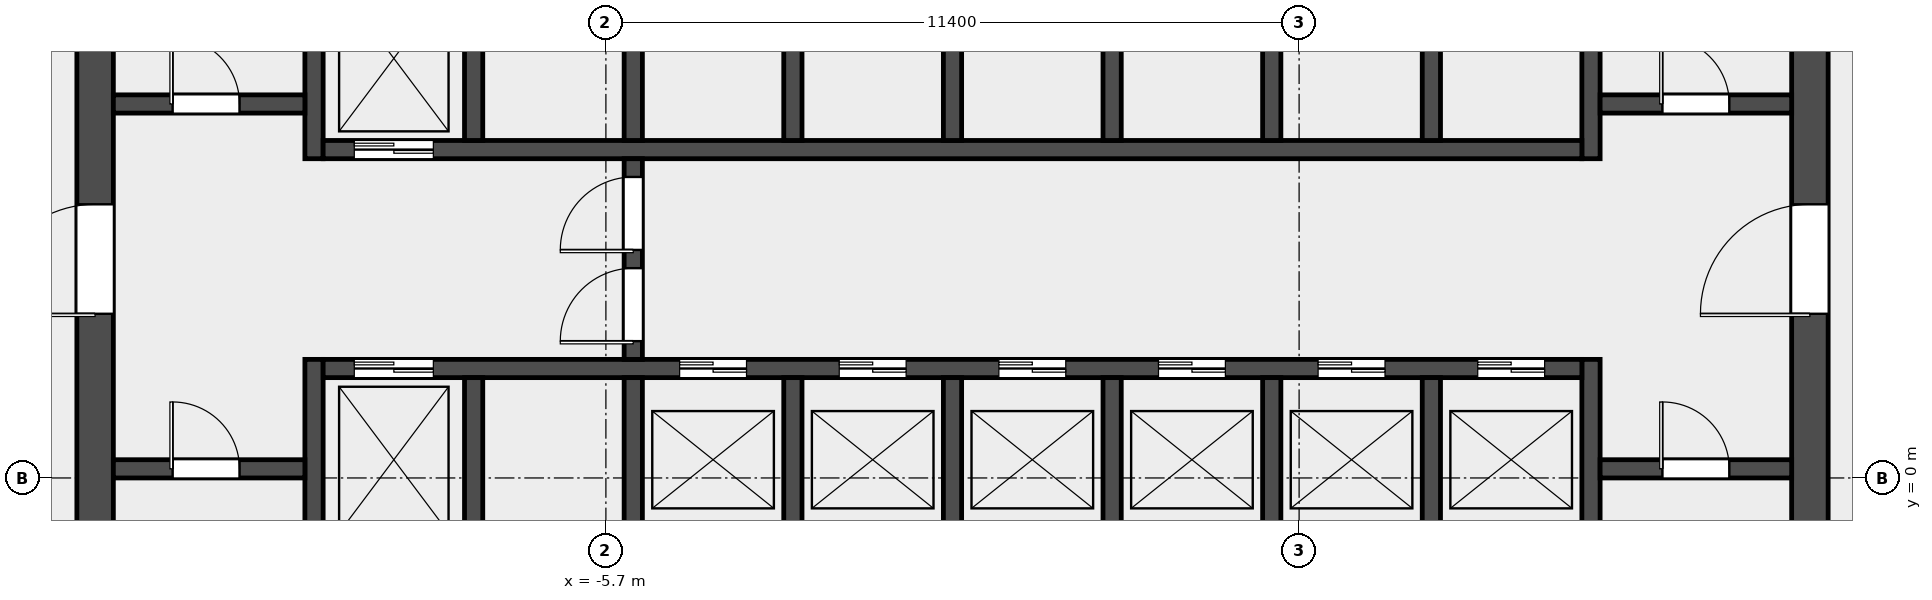
"""IFC4 building model, lengths in metres.
Left out: names, types, materials, properties, quantities, classifications, styles, units other than length and angle.
Written with IfcOpenShell. Run it as: python <this file> out.ifc"""

import sys

from ifc_helpers import new_model, si_unit, direction, frame, frame_2d, origin, place, context, subcontext, project, spatial, rectangle, extrude, element, fill, save


model = new_model("IFC4")
c1 = context("Model", 3, precision=1e-05, world=origin(), true_north=direction((0.0, 1.0)))
c2 = subcontext(c1, "Body", "Model", "MODEL_VIEW")
j1 = project(units=[si_unit("LENGTHUNIT", "METRE"), si_unit("PLANEANGLEUNIT", "RADIAN")], contexts=[c1])
p1 = place(None, origin())
s1 = spatial("IfcSite", under=j1, at=p1, CompositionType="ELEMENT")
p2 = place(p1, origin())
s2 = spatial("IfcBuilding", under=s1, at=p2, CompositionType="ELEMENT")
p3 = place(p2, frame((0.0, 0.0, 94.6)))
s3 = spatial("IfcBuildingStorey", under=s2, at=p3, CompositionType="ELEMENT", Elevation=94.6)
p4 = place(p3, frame((-14.1, -6.6, 0.0), z_axis=(0.0, 0.0, 1.0), x_axis=(0.0, 1.0, 0.0)))
e1 = element("IfcWall", 1, at=p4, inside=s3, PredefinedType="SHEAR", context=c2, shape_type="SweptSolid", body=[
    extrude(rectangle(XDim=19.5, YDim=0.6, at=frame_2d((9.75, 0.0))), origin(), (0.0, 0.0, 1.0), 4.2),
])
p5 = place(p4, frame((9.3, 0.0, 0.0)))
e2 = element("IfcOpeningElement", 2, at=p5, cuts=e1, PredefinedType="OPENING", context=c2, shape_type="SweptSolid", body=[
    extrude(rectangle(XDim=1.8, YDim=2.1, at=frame_2d((0.9, 1.05))), frame((0.0, 0.312, 0.0), z_axis=(0.0, -1.0, 0.0), x_axis=(1.0, 0.0, 0.0)), (0.0, 0.0, 1.0), 0.624),
])
p6 = place(p3, frame((14.1, -6.6, 0.0), z_axis=(0.0, 0.0, 1.0), x_axis=(0.0, 1.0, 0.0)))
e3 = element("IfcWall", 3, at=p6, inside=s3, PredefinedType="SHEAR", context=c2, shape_type="SweptSolid", body=[
    extrude(rectangle(XDim=19.5, YDim=0.6, at=frame_2d((9.75, 0.0))), origin(), (0.0, 0.0, 1.0), 4.2),
])
p7 = place(p6, frame((9.3, 0.0, 0.0)))
e4 = element("IfcOpeningElement", 4, at=p7, cuts=e3, PredefinedType="OPENING", context=c2, shape_type="SweptSolid", body=[
    extrude(rectangle(XDim=1.8, YDim=2.1, at=frame_2d((0.9, 1.05))), frame((0.0, 0.312, 0.0), z_axis=(0.0, -1.0, 0.0), x_axis=(1.0, 0.0, 0.0)), (0.0, 0.0, 1.0), 0.624),
])
p8 = place(p3, frame((-10.5, -6.6, 0.0), z_axis=(0.0, 0.0, 1.0), x_axis=(0.0, 1.0, 0.0)))
e5 = element("IfcWall", 5, at=p8, inside=s3, PredefinedType="SHEAR", context=c2, shape_type="SweptSolid", body=[
    extrude(rectangle(XDim=8.55, YDim=0.3, at=frame_2d((4.275, 0.0))), origin(), (0.0, 0.0, 1.0), 4.2),
])
p9 = place(p3, frame((-10.5, 5.25, 0.0), z_axis=(0.0, 0.0, 1.0), x_axis=(0.0, 1.0, 0.0)))
e6 = element("IfcWall", 6, at=p9, inside=s3, PredefinedType="SHEAR", context=c2, shape_type="SweptSolid", body=[
    extrude(rectangle(XDim=7.65, YDim=0.3, at=frame_2d((3.825, 0.0))), origin(), (0.0, 0.0, 1.0), 4.2),
])
p10 = place(p3, frame((10.5, -6.6, 0.0), z_axis=(0.0, 0.0, 1.0), x_axis=(0.0, 1.0, 0.0)))
e7 = element("IfcWall", 7, at=p10, inside=s3, PredefinedType="SHEAR", context=c2, shape_type="SweptSolid", body=[
    extrude(rectangle(XDim=8.55, YDim=0.3, at=frame_2d((4.275, 0.0))), origin(), (0.0, 0.0, 1.0), 4.2),
])
p11 = place(p3, frame((10.5, 5.25, 0.0), z_axis=(0.0, 0.0, 1.0), x_axis=(0.0, 1.0, 0.0)))
e8 = element("IfcWall", 8, at=p11, inside=s3, PredefinedType="SHEAR", context=c2, shape_type="SweptSolid", body=[
    extrude(rectangle(XDim=7.65, YDim=0.3, at=frame_2d((3.825, 0.0))), origin(), (0.0, 0.0, 1.0), 4.2),
])
p12 = place(p3, frame((-13.8, 0.15, 0.0), z_axis=(0.0, 0.0, 1.0), x_axis=(1.0, 0.0, 0.0)))
e9 = element("IfcWall", 9, at=p12, inside=s3, PredefinedType="SOLIDWALL", context=c2, shape_type="SweptSolid", body=[
    extrude(rectangle(XDim=3.15, YDim=0.3, at=frame_2d((1.575, 0.0))), origin(), (0.0, 0.0, 1.0), 4.2),
])
p13 = place(p12, frame((0.975, 0.0, 0.0)))
e10 = element("IfcOpeningElement", 10, at=p13, cuts=e9, PredefinedType="OPENING", context=c2, shape_type="SweptSolid", body=[
    extrude(rectangle(XDim=1.1, YDim=2.1, at=frame_2d((0.55, 1.05))), frame((0.0, 0.162, 0.0), z_axis=(0.0, -1.0, 0.0), x_axis=(1.0, 0.0, 0.0)), (0.0, 0.0, 1.0), 0.324),
])
p14 = place(p3, frame((-13.8, 6.15, 0.0), z_axis=(0.0, 0.0, 1.0), x_axis=(1.0, 0.0, 0.0)))
e11 = element("IfcWall", 11, at=p14, inside=s3, PredefinedType="SOLIDWALL", context=c2, shape_type="SweptSolid", body=[
    extrude(rectangle(XDim=3.15, YDim=0.3, at=frame_2d((1.575, 0.0))), origin(), (0.0, 0.0, 1.0), 4.2),
])
p15 = place(p14, frame((0.975, 0.0, 0.0)))
e12 = element("IfcOpeningElement", 12, at=p15, cuts=e11, PredefinedType="OPENING", context=c2, shape_type="SweptSolid", body=[
    extrude(rectangle(XDim=1.1, YDim=2.1, at=frame_2d((0.55, 1.05))), frame((0.0, 0.162, 0.0), z_axis=(0.0, -1.0, 0.0), x_axis=(1.0, 0.0, 0.0)), (0.0, 0.0, 1.0), 0.324),
])
p16 = place(p3, frame((10.65, 0.15, 0.0), z_axis=(0.0, 0.0, 1.0), x_axis=(1.0, 0.0, 0.0)))
e13 = element("IfcWall", 13, at=p16, inside=s3, PredefinedType="SOLIDWALL", context=c2, shape_type="SweptSolid", body=[
    extrude(rectangle(XDim=3.15, YDim=0.3, at=frame_2d((1.575, 0.0))), origin(), (0.0, 0.0, 1.0), 4.2),
])
p17 = place(p16, frame((1.025, 0.0, 0.0)))
e14 = element("IfcOpeningElement", 14, at=p17, cuts=e13, PredefinedType="OPENING", context=c2, shape_type="SweptSolid", body=[
    extrude(rectangle(XDim=1.1, YDim=2.1, at=frame_2d((0.55, 1.05))), frame((0.0, 0.162, 0.0), z_axis=(0.0, -1.0, 0.0), x_axis=(1.0, 0.0, 0.0)), (0.0, 0.0, 1.0), 0.324),
])
p18 = place(p3, frame((10.65, 6.15, 0.0), z_axis=(0.0, 0.0, 1.0), x_axis=(1.0, 0.0, 0.0)))
e15 = element("IfcWall", 15, at=p18, inside=s3, PredefinedType="SOLIDWALL", context=c2, shape_type="SweptSolid", body=[
    extrude(rectangle(XDim=3.15, YDim=0.3, at=frame_2d((1.575, 0.0))), origin(), (0.0, 0.0, 1.0), 4.2),
])
p19 = place(p18, frame((1.025, 0.0, 0.0)))
e16 = element("IfcOpeningElement", 16, at=p19, cuts=e15, PredefinedType="OPENING", context=c2, shape_type="SweptSolid", body=[
    extrude(rectangle(XDim=1.1, YDim=2.1, at=frame_2d((0.55, 1.05))), frame((0.0, 0.162, 0.0), z_axis=(0.0, -1.0, 0.0), x_axis=(1.0, 0.0, 0.0)), (0.0, 0.0, 1.0), 0.324),
])
p20 = place(p3, frame((-10.35, 1.8, 0.0), z_axis=(0.0, 0.0, 1.0), x_axis=(1.0, 0.0, 0.0)))
e17 = element("IfcWall", 17, at=p20, inside=s3, PredefinedType="SOLIDWALL", context=c2, shape_type="SweptSolid", body=[
    extrude(rectangle(XDim=20.7, YDim=0.3, at=frame_2d((10.35, 0.0))), origin(), (0.0, 0.0, 1.0), 4.2),
])
p21 = place(p20, frame((0.512, 0.0, 0.0)))
e18 = element("IfcOpeningElement", 18, at=p21, cuts=e17, PredefinedType="OPENING", context=c2, shape_type="SweptSolid", body=[
    extrude(rectangle(XDim=1.3, YDim=2.1, at=frame_2d((0.65, 1.05))), frame((0.0, 0.162, 0.0), z_axis=(0.0, -1.0, 0.0), x_axis=(1.0, 0.0, 0.0)), (0.0, 0.0, 1.0), 0.324),
])
p22 = place(p20, frame((5.863, 0.0, 0.0)))
e19 = element("IfcOpeningElement", 19, at=p22, cuts=e17, PredefinedType="OPENING", context=c2, shape_type="SweptSolid", body=[
    extrude(rectangle(XDim=1.1, YDim=2.1, at=frame_2d((0.55, 1.05))), frame((0.0, 0.162, 0.0), z_axis=(0.0, -1.0, 0.0), x_axis=(1.0, 0.0, 0.0)), (0.0, 0.0, 1.0), 0.324),
])
p23 = place(p20, frame((8.488, 0.0, 0.0)))
e20 = element("IfcOpeningElement", 20, at=p23, cuts=e17, PredefinedType="OPENING", context=c2, shape_type="SweptSolid", body=[
    extrude(rectangle(XDim=1.1, YDim=2.1, at=frame_2d((0.55, 1.05))), frame((0.0, 0.162, 0.0), z_axis=(0.0, -1.0, 0.0), x_axis=(1.0, 0.0, 0.0)), (0.0, 0.0, 1.0), 0.324),
])
p24 = place(p20, frame((11.113, 0.0, 0.0)))
e21 = element("IfcOpeningElement", 21, at=p24, cuts=e17, PredefinedType="OPENING", context=c2, shape_type="SweptSolid", body=[
    extrude(rectangle(XDim=1.1, YDim=2.1, at=frame_2d((0.55, 1.05))), frame((0.0, 0.162, 0.0), z_axis=(0.0, -1.0, 0.0), x_axis=(1.0, 0.0, 0.0)), (0.0, 0.0, 1.0), 0.324),
])
p25 = place(p20, frame((13.738, 0.0, 0.0)))
e22 = element("IfcOpeningElement", 22, at=p25, cuts=e17, PredefinedType="OPENING", context=c2, shape_type="SweptSolid", body=[
    extrude(rectangle(XDim=1.1, YDim=2.1, at=frame_2d((0.55, 1.05))), frame((0.0, 0.162, 0.0), z_axis=(0.0, -1.0, 0.0), x_axis=(1.0, 0.0, 0.0)), (0.0, 0.0, 1.0), 0.324),
])
p26 = place(p20, frame((16.363, 0.0, 0.0)))
e23 = element("IfcOpeningElement", 23, at=p26, cuts=e17, PredefinedType="OPENING", context=c2, shape_type="SweptSolid", body=[
    extrude(rectangle(XDim=1.1, YDim=2.1, at=frame_2d((0.55, 1.05))), frame((0.0, 0.162, 0.0), z_axis=(0.0, -1.0, 0.0), x_axis=(1.0, 0.0, 0.0)), (0.0, 0.0, 1.0), 0.324),
])
p27 = place(p20, frame((18.988, 0.0, 0.0)))
e24 = element("IfcOpeningElement", 24, at=p27, cuts=e17, PredefinedType="OPENING", context=c2, shape_type="SweptSolid", body=[
    extrude(rectangle(XDim=1.1, YDim=2.1, at=frame_2d((0.55, 1.05))), frame((0.0, 0.162, 0.0), z_axis=(0.0, -1.0, 0.0), x_axis=(1.0, 0.0, 0.0)), (0.0, 0.0, 1.0), 0.324),
])
p28 = place(p3, frame((-10.35, 5.4, 0.0), z_axis=(0.0, 0.0, 1.0), x_axis=(1.0, 0.0, 0.0)))
e25 = element("IfcWall", 25, at=p28, inside=s3, PredefinedType="SOLIDWALL", context=c2, shape_type="SweptSolid", body=[
    extrude(rectangle(XDim=20.7, YDim=0.3, at=frame_2d((10.35, 0.0))), origin(), (0.0, 0.0, 1.0), 4.2),
])
p29 = place(p28, frame((0.512, 0.0, 0.0)))
e26 = element("IfcOpeningElement", 26, at=p29, cuts=e25, PredefinedType="OPENING", context=c2, shape_type="SweptSolid", body=[
    extrude(rectangle(XDim=1.3, YDim=2.1, at=frame_2d((0.65, 1.05))), frame((0.0, 0.162, 0.0), z_axis=(0.0, -1.0, 0.0), x_axis=(1.0, 0.0, 0.0)), (0.0, 0.0, 1.0), 0.324),
])
for number, where, z_axis, x_axis in (
    (27, (-7.875, -1.05, 0.0), (0.0, 0.0, 1.0), (0.0, 1.0, 0.0)),
    (28, (-5.25, -1.05, 0.0), (0.0, 0.0, 1.0), (0.0, 1.0, 0.0)),
    (29, (-2.625, -1.05, 0.0), (0.0, 0.0, 1.0), (0.0, 1.0, 0.0)),
    (30, (0.0, -1.05, 0.0), (0.0, 0.0, 1.0), (0.0, 1.0, 0.0)),
    (31, (2.625, -1.05, 0.0), (0.0, 0.0, 1.0), (0.0, 1.0, 0.0)),
    (32, (5.25, -1.05, 0.0), (0.0, 0.0, 1.0), (0.0, 1.0, 0.0)),
    (33, (7.875, -1.05, 0.0), (0.0, 0.0, 1.0), (0.0, 1.0, 0.0)),
    (34, (-7.875, 5.55, 0.0), (0.0, 0.0, 1.0), (0.0, 1.0, 0.0)),
    (35, (-5.25, 5.55, 0.0), (0.0, 0.0, 1.0), (0.0, 1.0, 0.0)),
    (36, (-2.625, 5.55, 0.0), (0.0, 0.0, 1.0), (0.0, 1.0, 0.0)),
    (37, (0.0, 5.55, 0.0), (0.0, 0.0, 1.0), (0.0, 1.0, 0.0)),
    (38, (2.625, 5.55, 0.0), (0.0, 0.0, 1.0), (0.0, 1.0, 0.0)),
    (39, (5.25, 5.55, 0.0), (0.0, 0.0, 1.0), (0.0, 1.0, 0.0)),
    (40, (7.875, 5.55, 0.0), (0.0, 0.0, 1.0), (0.0, 1.0, 0.0)),
):
    element("IfcWall", number, at=place(p3, frame(where, z_axis=z_axis, x_axis=x_axis)), inside=s3, PredefinedType="SOLIDWALL", context=c2, shape_type="SweptSolid", body=[
        extrude(rectangle(XDim=2.7, YDim=0.3, at=frame_2d((1.35, 0.0))), origin(), (0.0, 0.0, 1.0), 4.2),
    ])
p30 = place(p3, frame((-5.25, 1.95, 0.0), z_axis=(0.0, 0.0, 1.0), x_axis=(0.0, 1.0, 0.0)))
e41 = element("IfcWall", 41, at=p30, inside=s3, PredefinedType="SOLIDWALL", context=c2, shape_type="SweptSolid", body=[
    extrude(rectangle(XDim=3.3, YDim=0.3, at=frame_2d((1.65, 0.0))), origin(), (0.0, 0.0, 1.0), 4.2),
])
p31 = place(p30, frame((0.3, 0.0, 0.0)))
e42 = element("IfcOpeningElement", 42, at=p31, cuts=e41, PredefinedType="OPENING", context=c2, shape_type="SweptSolid", body=[
    extrude(rectangle(XDim=1.2, YDim=2.1, at=frame_2d((0.6, 1.05))), frame((0.0, 0.162, 0.0), z_axis=(0.0, -1.0, 0.0), x_axis=(1.0, 0.0, 0.0)), (0.0, 0.0, 1.0), 0.324),
])
p32 = place(p30, frame((1.8, 0.0, 0.0)))
e43 = element("IfcOpeningElement", 43, at=p32, cuts=e41, PredefinedType="OPENING", context=c2, shape_type="SweptSolid", body=[
    extrude(rectangle(XDim=1.2, YDim=2.1, at=frame_2d((0.6, 1.05))), frame((0.0, 0.162, 0.0), z_axis=(0.0, -1.0, 0.0), x_axis=(1.0, 0.0, 0.0)), (0.0, 0.0, 1.0), 0.324),
])
p33 = place(p13, origin())
e44 = element("IfcDoor", 44, at=p33, inside=s3, OperationType="SINGLE_SWING_LEFT", PredefinedType="DOOR", context=c2, shape_type="SweptSolid", body=[
    extrude(rectangle(XDim=1.1, YDim=2.1, at=frame_2d((0.55, 1.05))), frame((0.0, 0.025, 0.0), z_axis=(0.0, -1.0, 0.0), x_axis=(1.0, 0.0, 0.0)), (0.0, 0.0, 1.0), 0.05),
])
fill(e10, e44)
p34 = place(p15, origin())
e45 = element("IfcDoor", 45, at=p34, inside=s3, OperationType="SINGLE_SWING_LEFT", PredefinedType="DOOR", context=c2, shape_type="SweptSolid", body=[
    extrude(rectangle(XDim=1.1, YDim=2.1, at=frame_2d((0.55, 1.05))), frame((0.0, 0.025, 0.0), z_axis=(0.0, -1.0, 0.0), x_axis=(1.0, 0.0, 0.0)), (0.0, 0.0, 1.0), 0.05),
])
fill(e12, e45)
p35 = place(p17, origin())
e46 = element("IfcDoor", 46, at=p35, inside=s3, OperationType="SINGLE_SWING_RIGHT", PredefinedType="DOOR", context=c2, shape_type="SweptSolid", body=[
    extrude(rectangle(XDim=1.1, YDim=2.1, at=frame_2d((0.55, 1.05))), frame((0.0, 0.025, 0.0), z_axis=(0.0, -1.0, 0.0), x_axis=(1.0, 0.0, 0.0)), (0.0, 0.0, 1.0), 0.05),
])
fill(e14, e46)
p36 = place(p19, origin())
e47 = element("IfcDoor", 47, at=p36, inside=s3, OperationType="SINGLE_SWING_RIGHT", PredefinedType="DOOR", context=c2, shape_type="SweptSolid", body=[
    extrude(rectangle(XDim=1.1, YDim=2.1, at=frame_2d((0.55, 1.05))), frame((0.0, 0.025, 0.0), z_axis=(0.0, -1.0, 0.0), x_axis=(1.0, 0.0, 0.0)), (0.0, 0.0, 1.0), 0.05),
])
fill(e16, e47)
p37 = place(p5, origin())
e48 = element("IfcDoor", 48, at=p37, inside=s3, OperationType="DOUBLE_DOOR_SINGLE_SWING", PredefinedType="DOOR", context=c2, shape_type="SweptSolid", body=[
    extrude(rectangle(XDim=1.8, YDim=2.1, at=frame_2d((0.9, 1.05))), frame((0.0, 0.025, 0.0), z_axis=(0.0, -1.0, 0.0), x_axis=(1.0, 0.0, 0.0)), (0.0, 0.0, 1.0), 0.05),
])
fill(e2, e48)
p38 = place(p7, origin())
e49 = element("IfcDoor", 49, at=p38, inside=s3, OperationType="DOUBLE_DOOR_SINGLE_SWING", PredefinedType="DOOR", context=c2, shape_type="SweptSolid", body=[
    extrude(rectangle(XDim=1.8, YDim=2.1, at=frame_2d((0.9, 1.05))), frame((0.0, 0.025, 0.0), z_axis=(0.0, -1.0, 0.0), x_axis=(1.0, 0.0, 0.0)), (0.0, 0.0, 1.0), 0.05),
])
fill(e4, e49)
p39 = place(p31, origin())
e50 = element("IfcDoor", 50, at=p39, inside=s3, OperationType="SINGLE_SWING_LEFT", PredefinedType="DOOR", context=c2, shape_type="SweptSolid", body=[
    extrude(rectangle(XDim=1.2, YDim=2.1, at=frame_2d((0.6, 1.05))), frame((0.0, 0.025, 0.0), z_axis=(0.0, -1.0, 0.0), x_axis=(1.0, 0.0, 0.0)), (0.0, 0.0, 1.0), 0.05),
])
fill(e42, e50)
p40 = place(p32, origin())
e51 = element("IfcDoor", 51, at=p40, inside=s3, OperationType="SINGLE_SWING_RIGHT", PredefinedType="DOOR", context=c2, shape_type="SweptSolid", body=[
    extrude(rectangle(XDim=1.2, YDim=2.1, at=frame_2d((0.6, 1.05))), frame((0.0, 0.025, 0.0), z_axis=(0.0, -1.0, 0.0), x_axis=(1.0, 0.0, 0.0)), (0.0, 0.0, 1.0), 0.05),
])
fill(e43, e51)
p41 = place(p21, origin())
e52 = element("IfcDoor", 52, at=p41, inside=s3, OperationType="DOUBLE_DOOR_SLIDING", PredefinedType="DOOR", context=c2, shape_type="SweptSolid", body=[
    extrude(rectangle(XDim=1.3, YDim=2.1, at=frame_2d((0.65, 1.05))), frame((0.0, 0.025, 0.0), z_axis=(0.0, -1.0, 0.0), x_axis=(1.0, 0.0, 0.0)), (0.0, 0.0, 1.0), 0.05),
])
fill(e18, e52)
p42 = place(p22, origin())
e53 = element("IfcDoor", 53, at=p42, inside=s3, OperationType="DOUBLE_DOOR_SLIDING", PredefinedType="DOOR", context=c2, shape_type="SweptSolid", body=[
    extrude(rectangle(XDim=1.1, YDim=2.1, at=frame_2d((0.55, 1.05))), frame((0.0, 0.025, 0.0), z_axis=(0.0, -1.0, 0.0), x_axis=(1.0, 0.0, 0.0)), (0.0, 0.0, 1.0), 0.05),
])
fill(e19, e53)
p43 = place(p23, origin())
e54 = element("IfcDoor", 54, at=p43, inside=s3, OperationType="DOUBLE_DOOR_SLIDING", PredefinedType="DOOR", context=c2, shape_type="SweptSolid", body=[
    extrude(rectangle(XDim=1.1, YDim=2.1, at=frame_2d((0.55, 1.05))), frame((0.0, 0.025, 0.0), z_axis=(0.0, -1.0, 0.0), x_axis=(1.0, 0.0, 0.0)), (0.0, 0.0, 1.0), 0.05),
])
fill(e20, e54)
p44 = place(p24, origin())
e55 = element("IfcDoor", 55, at=p44, inside=s3, OperationType="DOUBLE_DOOR_SLIDING", PredefinedType="DOOR", context=c2, shape_type="SweptSolid", body=[
    extrude(rectangle(XDim=1.1, YDim=2.1, at=frame_2d((0.55, 1.05))), frame((0.0, 0.025, 0.0), z_axis=(0.0, -1.0, 0.0), x_axis=(1.0, 0.0, 0.0)), (0.0, 0.0, 1.0), 0.05),
])
fill(e21, e55)
p45 = place(p25, origin())
e56 = element("IfcDoor", 56, at=p45, inside=s3, OperationType="DOUBLE_DOOR_SLIDING", PredefinedType="DOOR", context=c2, shape_type="SweptSolid", body=[
    extrude(rectangle(XDim=1.1, YDim=2.1, at=frame_2d((0.55, 1.05))), frame((0.0, 0.025, 0.0), z_axis=(0.0, -1.0, 0.0), x_axis=(1.0, 0.0, 0.0)), (0.0, 0.0, 1.0), 0.05),
])
fill(e22, e56)
p46 = place(p26, origin())
e57 = element("IfcDoor", 57, at=p46, inside=s3, OperationType="DOUBLE_DOOR_SLIDING", PredefinedType="DOOR", context=c2, shape_type="SweptSolid", body=[
    extrude(rectangle(XDim=1.1, YDim=2.1, at=frame_2d((0.55, 1.05))), frame((0.0, 0.025, 0.0), z_axis=(0.0, -1.0, 0.0), x_axis=(1.0, 0.0, 0.0)), (0.0, 0.0, 1.0), 0.05),
])
fill(e23, e57)
p47 = place(p27, origin())
e58 = element("IfcDoor", 58, at=p47, inside=s3, OperationType="DOUBLE_DOOR_SLIDING", PredefinedType="DOOR", context=c2, shape_type="SweptSolid", body=[
    extrude(rectangle(XDim=1.1, YDim=2.1, at=frame_2d((0.55, 1.05))), frame((0.0, 0.025, 0.0), z_axis=(0.0, -1.0, 0.0), x_axis=(1.0, 0.0, 0.0)), (0.0, 0.0, 1.0), 0.05),
])
fill(e24, e58)
p48 = place(p29, origin())
e59 = element("IfcDoor", 59, at=p48, inside=s3, OperationType="DOUBLE_DOOR_SLIDING", PredefinedType="DOOR", context=c2, shape_type="SweptSolid", body=[
    extrude(rectangle(XDim=1.3, YDim=2.1, at=frame_2d((0.65, 1.05))), frame((0.0, 0.025, 0.0), z_axis=(0.0, -1.0, 0.0), x_axis=(1.0, 0.0, 0.0)), (0.0, 0.0, 1.0), 0.05),
])
fill(e26, e59)
save(model, sys.argv[1])
